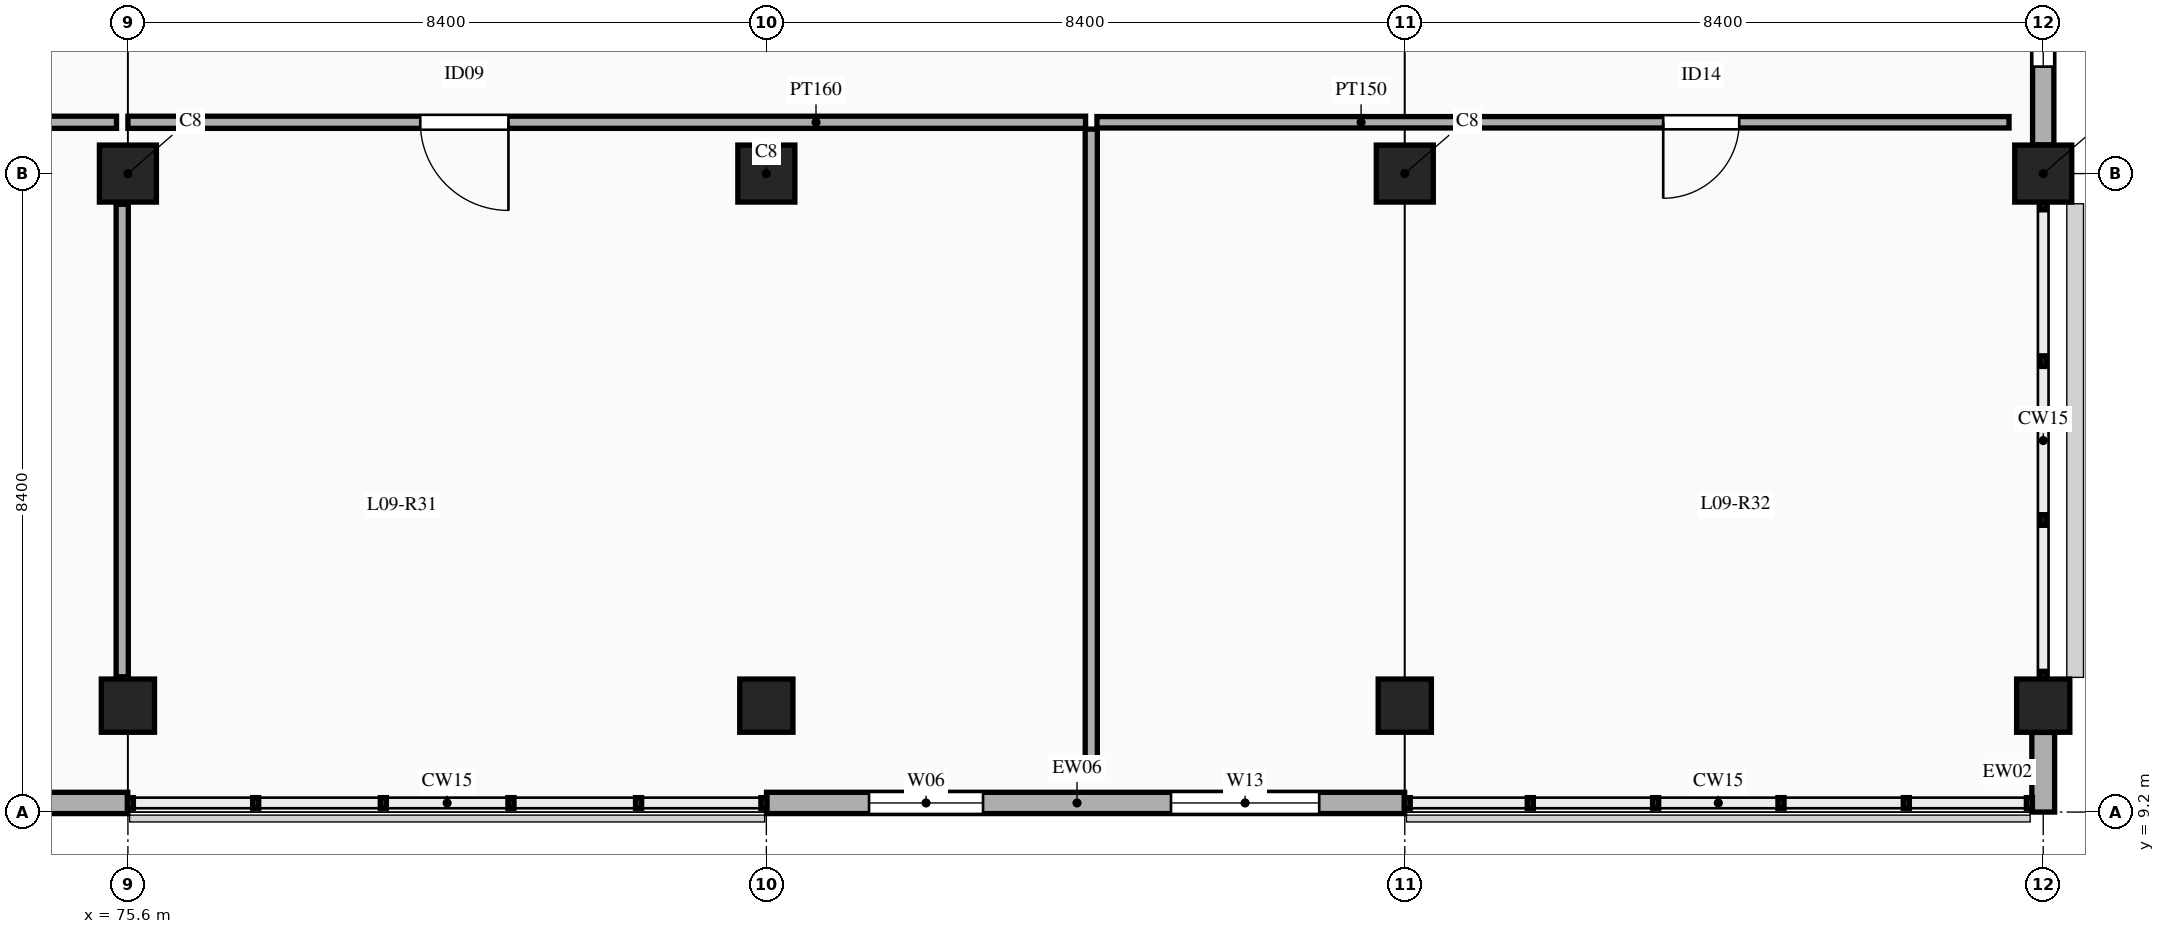
"""IFC4 building model, lengths in metres.
Left out: names, types, materials, properties, quantities, classifications, styles, units other than length and angle.
Written with IfcOpenShell. Run it as: python <this file> out.ifc"""

import sys

from ifc_helpers import new_model, si_unit, direction, frame, frame_2d, origin, origin_2d, place, context, subcontext, project, spatial, rectangle, extrude, element, fill, save


model = new_model("IFC4")
c1 = context("Model", 3, precision=1e-05, world=origin(), true_north=direction((0.0, 1.0)))
c2 = subcontext(c1, "Body", "Model", "MODEL_VIEW")
j1 = project(units=[si_unit("LENGTHUNIT", "METRE"), si_unit("PLANEANGLEUNIT", "RADIAN")], contexts=[c1])
p1 = place(None, origin())
s1 = spatial("IfcSite", under=j1, at=p1, CompositionType="ELEMENT")
p2 = place(p1, origin())
s2 = spatial("IfcBuilding", under=s1, at=p2, CompositionType="ELEMENT")
p3 = place(p2, frame((0.0, 0.0, 42.0)))
s3 = spatial("IfcBuildingStorey", under=s2, at=p3, CompositionType="ELEMENT", Elevation=42.0)
p4 = place(p3, frame((75.6, 10.6, 0.0), z_axis=(0.0, 0.0, 1.0), x_axis=(1.0, 0.0, 0.0)))
e1 = element("IfcColumn", 1, at=p4, inside=s3, PredefinedType="COLUMN", context=c2, shape_type="SweptSolid", body=[
    extrude(rectangle(XDim=0.7, YDim=0.7, at=origin_2d()), origin(), (0.0, 0.0, 1.0), 4.5),
])
p5 = place(p3, frame((75.6, 17.6, 0.0), z_axis=(0.0, 0.0, 1.0), x_axis=(1.0, 0.0, 0.0)))
e2 = element("IfcColumn", 2, at=p5, inside=s3, PredefinedType="COLUMN", context=c2, shape_type="SweptSolid", body=[
    extrude(rectangle(XDim=0.75, YDim=0.75, at=origin_2d()), origin(), (0.0, 0.0, 1.0), 4.5),
])
p6 = place(p3, frame((84.0, 10.6, 0.0), z_axis=(0.0, 0.0, 1.0), x_axis=(1.0, 0.0, 0.0)))
e3 = element("IfcColumn", 3, at=p6, inside=s3, PredefinedType="COLUMN", context=c2, shape_type="SweptSolid", body=[
    extrude(rectangle(XDim=0.7, YDim=0.7, at=origin_2d()), origin(), (0.0, 0.0, 1.0), 4.5),
])
p7 = place(p3, frame((84.0, 17.6, 0.0), z_axis=(0.0, 0.0, 1.0), x_axis=(1.0, 0.0, 0.0)))
e4 = element("IfcColumn", 4, at=p7, inside=s3, PredefinedType="COLUMN", context=c2, shape_type="SweptSolid", body=[
    extrude(rectangle(XDim=0.75, YDim=0.75, at=origin_2d()), origin(), (0.0, 0.0, 1.0), 4.5),
])
p8 = place(p3, frame((92.4, 10.6, 0.0), z_axis=(0.0, 0.0, 1.0), x_axis=(1.0, 0.0, 0.0)))
e5 = element("IfcColumn", 5, at=p8, inside=s3, PredefinedType="COLUMN", context=c2, shape_type="SweptSolid", body=[
    extrude(rectangle(XDim=0.7, YDim=0.7, at=origin_2d()), origin(), (0.0, 0.0, 1.0), 4.5),
])
p9 = place(p3, frame((92.4, 17.6, 0.0), z_axis=(0.0, 0.0, 1.0), x_axis=(1.0, 0.0, 0.0)))
e6 = element("IfcColumn", 6, at=p9, inside=s3, PredefinedType="COLUMN", context=c2, shape_type="SweptSolid", body=[
    extrude(rectangle(XDim=0.75, YDim=0.75, at=origin_2d()), origin(), (0.0, 0.0, 1.0), 4.5),
])
p10 = place(p3, frame((100.8, 10.6, 0.0), z_axis=(0.0, 0.0, 1.0), x_axis=(1.0, 0.0, 0.0)))
e7 = element("IfcColumn", 7, at=p10, inside=s3, PredefinedType="COLUMN", context=c2, shape_type="SweptSolid", body=[
    extrude(rectangle(XDim=0.7, YDim=0.7, at=origin_2d()), origin(), (0.0, 0.0, 1.0), 4.5),
])
p11 = place(p3, frame((100.8, 17.6, 0.0), z_axis=(0.0, 0.0, 1.0), x_axis=(1.0, 0.0, 0.0)))
e8 = element("IfcColumn", 8, at=p11, inside=s3, PredefinedType="COLUMN", context=c2, shape_type="SweptSolid", body=[
    extrude(rectangle(XDim=0.75, YDim=0.75, at=origin_2d()), origin(), (0.0, 0.0, 1.0), 4.5),
])
p12 = place(p3, frame((100.8, 9.2, 0.0), z_axis=(0.0, 0.0, 1.0), x_axis=(0.0, 1.0, 0.0)))
e9 = element("IfcWall", 9, at=p12, inside=s3, PredefinedType="SOLIDWALL", context=c2, shape_type="SweptSolid", body=[
    extrude(rectangle(XDim=1.048, YDim=0.3, at=frame_2d((0.524, 0.0))), origin(), (0.0, 0.0, 1.0), 3.55),
])
p13 = place(p3, frame((67.202, 9.32, 0.0), z_axis=(0.0, 0.0, 1.0), x_axis=(1.0, 0.0, 0.0)))
e10 = element("IfcWall", 10, at=p13, inside=s3, PredefinedType="ELEMENTEDWALL", context=c2, shape_type="SweptSolid", body=[
    extrude(rectangle(XDim=8.396, YDim=0.28, at=frame_2d((4.198, 0.0))), origin(), (0.0, 0.0, 1.0), 3.55),
])
p14 = place(p13, frame((1.349, 0.0, 0.9)))
e11 = element("IfcOpeningElement", 11, at=p14, cuts=e10, PredefinedType="OPENING", context=c2, shape_type="SweptSolid", body=[
    extrude(rectangle(XDim=1.5, YDim=2.0, at=frame_2d((0.75, 1.0))), frame((0.0, 0.15, 0.0), z_axis=(0.0, -1.0, 0.0), x_axis=(1.0, 0.0, 0.0)), (0.0, 0.0, 1.0), 0.3),
])
p15 = place(p13, frame((5.322, 0.0, 0.9)))
e12 = element("IfcOpeningElement", 12, at=p15, cuts=e10, PredefinedType="OPENING", context=c2, shape_type="SweptSolid", body=[
    extrude(rectangle(XDim=1.95, YDim=2.0, at=frame_2d((0.975, 1.0))), frame((0.0, 0.15, 0.0), z_axis=(0.0, -1.0, 0.0), x_axis=(1.0, 0.0, 0.0)), (0.0, 0.0, 1.0), 0.3),
])
p16 = place(p3, frame((84.002, 9.32, 0.0), z_axis=(0.0, 0.0, 1.0), x_axis=(1.0, 0.0, 0.0)))
e13 = element("IfcWall", 13, at=p16, inside=s3, PredefinedType="ELEMENTEDWALL", context=c2, shape_type="SweptSolid", body=[
    extrude(rectangle(XDim=8.396, YDim=0.28, at=frame_2d((4.198, 0.0))), origin(), (0.0, 0.0, 1.0), 3.55),
])
p17 = place(p16, frame((1.349, 0.0, 0.9)))
e14 = element("IfcOpeningElement", 14, at=p17, cuts=e13, PredefinedType="OPENING", context=c2, shape_type="SweptSolid", body=[
    extrude(rectangle(XDim=1.5, YDim=2.0, at=frame_2d((0.75, 1.0))), frame((0.0, 0.15, 0.0), z_axis=(0.0, -1.0, 0.0), x_axis=(1.0, 0.0, 0.0)), (0.0, 0.0, 1.0), 0.3),
])
p18 = place(p16, frame((5.322, 0.0, 0.9)))
e15 = element("IfcOpeningElement", 15, at=p18, cuts=e13, PredefinedType="OPENING", context=c2, shape_type="SweptSolid", body=[
    extrude(rectangle(XDim=1.95, YDim=2.0, at=frame_2d((0.975, 1.0))), frame((0.0, 0.15, 0.0), z_axis=(0.0, -1.0, 0.0), x_axis=(1.0, 0.0, 0.0)), (0.0, 0.0, 1.0), 0.3),
])
p19 = place(p3, frame((100.8, 17.977, 0.0), z_axis=(0.0, 0.0, 1.0), x_axis=(0.0, 1.0, 0.0)))
e16 = element("IfcWall", 16, at=p19, inside=s3, PredefinedType="ELEMENTEDWALL", context=c2, shape_type="SweptSolid", body=[
    extrude(rectangle(XDim=7.821, YDim=0.28, at=frame_2d((3.911, 0.0))), origin(), (0.0, 0.0, 1.0), 3.55),
])
p20 = place(p19, frame((1.03, 0.0, 0.9)))
e17 = element("IfcOpeningElement", 17, at=p20, cuts=e16, PredefinedType="OPENING", context=c2, shape_type="SweptSolid", body=[
    extrude(rectangle(XDim=1.85, YDim=2.05, at=frame_2d((0.925, 1.025))), frame((0.0, 0.15, 0.0), z_axis=(0.0, -1.0, 0.0), x_axis=(1.0, 0.0, 0.0)), (0.0, 0.0, 1.0), 0.3),
])
p21 = place(p3, frame((63.15, 18.275, 0.0), z_axis=(0.0, 0.0, 1.0), x_axis=(1.0, 0.0, 0.0)))
e18 = element("IfcWall", 18, at=p21, inside=s3, PredefinedType="PARTITIONING", context=c2, shape_type="SweptSolid", body=[
    extrude(rectangle(XDim=12.3, YDim=0.16, at=frame_2d((6.15, 0.0))), origin(), (0.0, 0.0, 1.0), 3.45),
])
p22 = place(p21, frame((7.443, 0.0, 0.0)))
e19 = element("IfcOpeningElement", 19, at=p22, cuts=e18, PredefinedType="OPENING", context=c2, shape_type="SweptSolid", body=[
    extrude(rectangle(XDim=1.16, YDim=2.2, at=frame_2d((0.58, 1.1))), frame((0.0, 0.09, 0.0), z_axis=(0.0, -1.0, 0.0), x_axis=(1.0, 0.0, 0.0)), (0.0, 0.0, 1.0), 0.18),
])
p23 = place(p3, frame((75.6, 18.275, 0.0), z_axis=(0.0, 0.0, 1.0), x_axis=(1.0, 0.0, 0.0)))
e20 = element("IfcWall", 20, at=p23, inside=s3, PredefinedType="PARTITIONING", context=c2, shape_type="SweptSolid", body=[
    extrude(rectangle(XDim=12.6, YDim=0.16, at=frame_2d((6.3, 0.0))), origin(), (0.0, 0.0, 1.0), 3.45),
])
p24 = place(p23, frame((3.847, 0.0, 0.0)))
e21 = element("IfcOpeningElement", 21, at=p24, cuts=e20, PredefinedType="OPENING", context=c2, shape_type="SweptSolid", body=[
    extrude(rectangle(XDim=1.16, YDim=2.2, at=frame_2d((0.58, 1.1))), frame((0.0, 0.09, 0.0), z_axis=(0.0, -1.0, 0.0), x_axis=(1.0, 0.0, 0.0)), (0.0, 0.0, 1.0), 0.18),
])
p25 = place(p3, frame((88.35, 18.275, 0.0), z_axis=(0.0, 0.0, 1.0), x_axis=(1.0, 0.0, 0.0)))
e22 = element("IfcWall", 22, at=p25, inside=s3, PredefinedType="PARTITIONING", context=c2, shape_type="SweptSolid", body=[
    extrude(rectangle(XDim=12.0, YDim=0.15, at=frame_2d((6.0, 0.0))), origin(), (0.0, 0.0, 1.0), 3.45),
])
p26 = place(p25, frame((7.45, 0.0, 0.0)))
e23 = element("IfcOpeningElement", 23, at=p26, cuts=e22, PredefinedType="OPENING", context=c2, shape_type="SweptSolid", body=[
    extrude(rectangle(XDim=1.0, YDim=2.15, at=frame_2d((0.5, 1.075))), frame((0.0, 0.085, 0.0), z_axis=(0.0, -1.0, 0.0), x_axis=(1.0, 0.0, 0.0)), (0.0, 0.0, 1.0), 0.17),
])
p27 = place(p3, frame((75.525, 10.98, 0.0), z_axis=(0.0, 0.0, 1.0), x_axis=(0.0, 1.0, 0.0)))
e24 = element("IfcWall", 24, at=p27, inside=s3, PredefinedType="PARTITIONING", context=c2, shape_type="SweptSolid", body=[
    extrude(rectangle(XDim=6.215, YDim=0.16, at=frame_2d((3.107, 0.0))), origin(), (0.0, 0.0, 1.0), 3.45),
])
p28 = place(p3, frame((88.275, 9.65, 0.0), z_axis=(0.0, 0.0, 1.0), x_axis=(0.0, 1.0, 0.0)))
e25 = element("IfcWall", 25, at=p28, inside=s3, PredefinedType="PARTITIONING", context=c2, shape_type="SweptSolid", body=[
    extrude(rectangle(XDim=8.535, YDim=0.16, at=frame_2d((4.268, 0.0))), origin(), (0.0, 0.0, 1.0), 3.45),
])
p29 = place(p17, origin())
e26 = element("IfcWindow", 26, at=p29, inside=s3, PartitioningType="DOUBLE_PANEL_VERTICAL", PredefinedType="WINDOW", context=c2, shape_type="SweptSolid", body=[
    extrude(rectangle(XDim=1.5, YDim=2.0, at=frame_2d((0.75, 1.0))), frame((0.0, 0.03, 0.0), z_axis=(0.0, -1.0, 0.0), x_axis=(1.0, 0.0, 0.0)), (0.0, 0.0, 1.0), 0.06),
])
fill(e14, e26)
p30 = place(p18, origin())
e27 = element("IfcWindow", 27, at=p30, inside=s3, PartitioningType="TRIPLE_PANEL_VERTICAL", PredefinedType="WINDOW", context=c2, shape_type="SweptSolid", body=[
    extrude(rectangle(XDim=1.95, YDim=2.0, at=frame_2d((0.975, 1.0))), frame((0.0, 0.03, 0.0), z_axis=(0.0, -1.0, 0.0), x_axis=(1.0, 0.0, 0.0)), (0.0, 0.0, 1.0), 0.06),
])
fill(e15, e27)
p31 = place(p20, origin())
e28 = element("IfcWindow", 28, at=p31, inside=s3, PartitioningType="DOUBLE_PANEL_HORIZONTAL", PredefinedType="WINDOW", context=c2, shape_type="SweptSolid", body=[
    extrude(rectangle(XDim=1.85, YDim=2.05, at=frame_2d((0.925, 1.025))), frame((0.0, 0.03, 0.0), z_axis=(0.0, -1.0, 0.0), x_axis=(1.0, 0.0, 0.0)), (0.0, 0.0, 1.0), 0.06),
])
fill(e17, e28)
p32 = place(p24, frame((1.16, 0.0, 0.0), z_axis=(0.0, 0.0, 1.0), x_axis=(-1.0, 0.0, 0.0)))
e29 = element("IfcDoor", 29, at=p32, inside=s3, OperationType="SINGLE_SWING_LEFT", PredefinedType="DOOR", context=c2, shape_type="SweptSolid", body=[
    extrude(rectangle(XDim=1.16, YDim=2.2, at=frame_2d((0.58, 1.1))), frame((0.0, 0.025, 0.0), z_axis=(0.0, -1.0, 0.0), x_axis=(1.0, 0.0, 0.0)), (0.0, 0.0, 1.0), 0.05),
])
fill(e21, e29)
p33 = place(p26, frame((1.0, 0.0, 0.0), z_axis=(0.0, 0.0, 1.0), x_axis=(-1.0, 0.0, 0.0)))
e30 = element("IfcDoor", 30, at=p33, inside=s3, OperationType="SINGLE_SWING_RIGHT", PredefinedType="DOOR", context=c2, shape_type="SweptSolid", body=[
    extrude(rectangle(XDim=1.0, YDim=2.15, at=frame_2d((0.5, 1.075))), frame((0.0, 0.025, 0.0), z_axis=(0.0, -1.0, 0.0), x_axis=(1.0, 0.0, 0.0)), (0.0, 0.0, 1.0), 0.05),
])
fill(e23, e30)
save(model, sys.argv[1])
